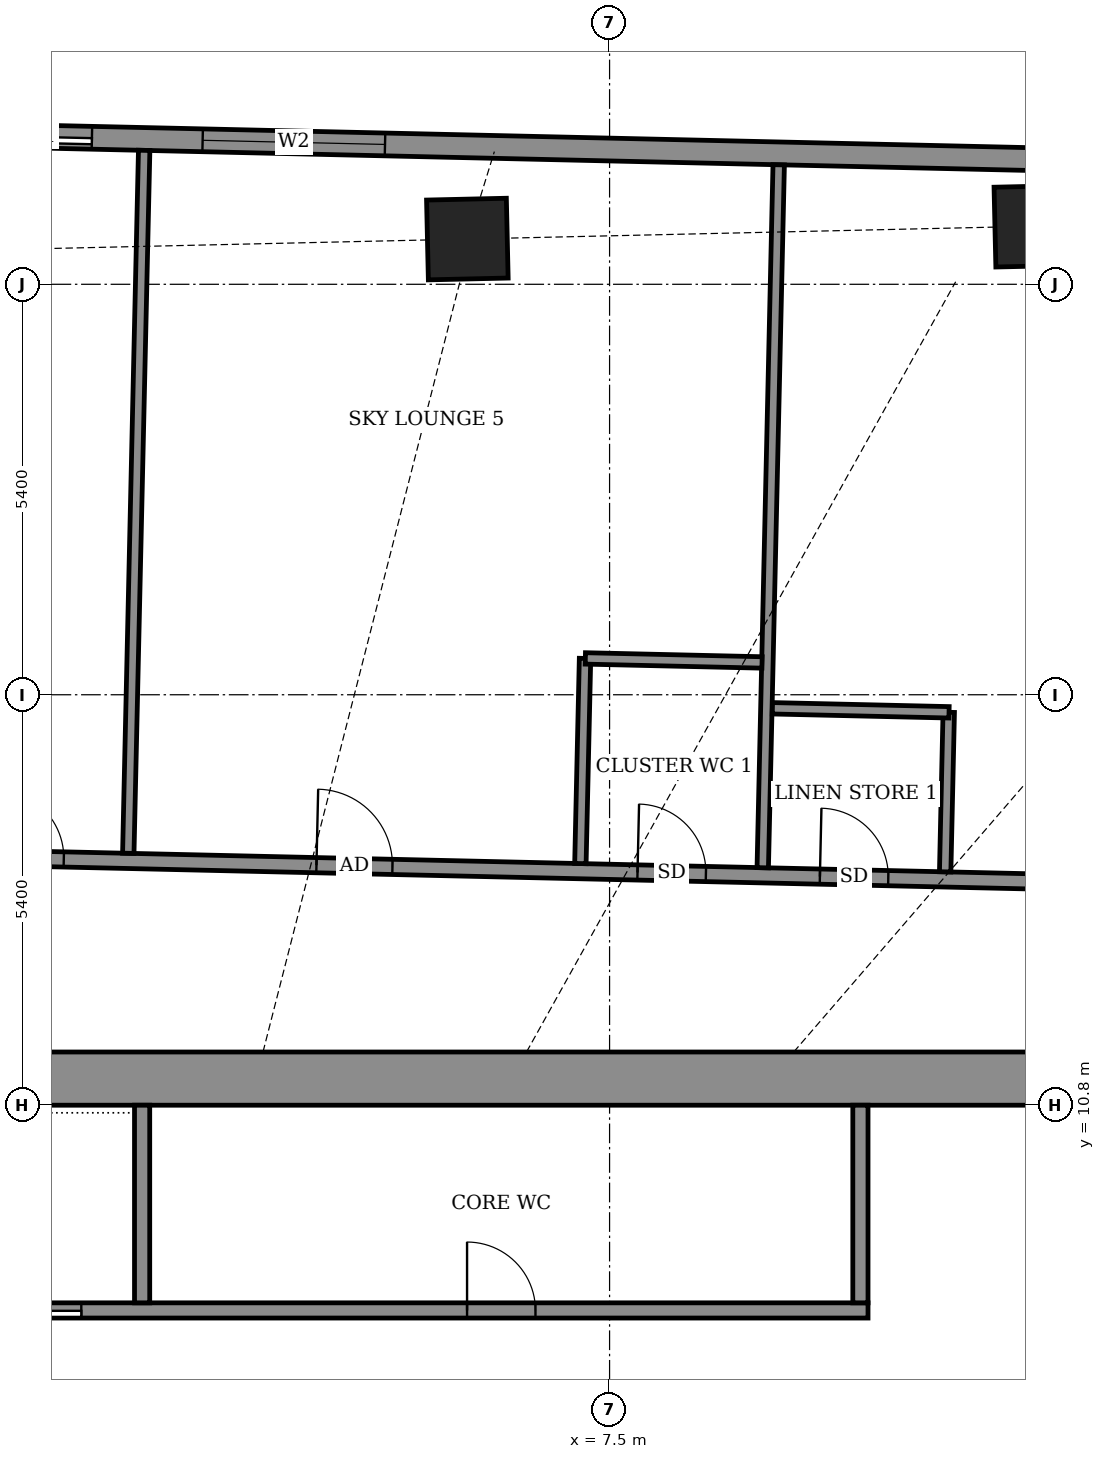
"""IFC4 building model, lengths in metres.
Left out: names, types, materials, properties, quantities, classifications, styles, units other than length and angle.
Written with IfcOpenShell. Run it as: python <this file> out.ifc"""

import sys

from ifc_helpers import new_model, si_unit, direction, frame, frame_2d, origin, origin_2d, place, context, subcontext, project, spatial, rectangle, extrude, element, fill, save


model = new_model("IFC4")
c1 = context("Model", 3, precision=1e-05, world=origin(), true_north=direction((0.0, 1.0)))
c2 = subcontext(c1, "Body", "Model", "MODEL_VIEW")
j1 = project(units=[si_unit("LENGTHUNIT", "METRE"), si_unit("PLANEANGLEUNIT", "RADIAN")], contexts=[c1])
p1 = place(None, origin())
s1 = spatial("IfcSite", under=j1, at=p1, CompositionType="ELEMENT")
p2 = place(p1, origin())
s2 = spatial("IfcBuilding", under=s1, at=p2, CompositionType="ELEMENT")
p3 = place(p2, frame((0.0, 0.0, 252.7)))
s3 = spatial("IfcBuildingStorey", under=s2, at=p3, CompositionType="ELEMENT", Elevation=252.7)
for number, where, z_axis, x_axis in (
    (1, (13.095, 22.364, -0.55), (0.0, 0.0, 1.0), (-1.0, -0.023, 0.0)),
    (2, (5.629, 22.195, -0.55), (0.0, 0.0, 1.0), (-1.0, -0.023, 0.0)),
):
    element("IfcColumn", number, at=place(p3, frame(where, z_axis=z_axis, x_axis=x_axis)), inside=s3, PredefinedType="COLUMN", context=c2, shape_type="SweptSolid", body=[
        extrude(rectangle(XDim=1.05, YDim=1.05, at=origin_2d()), origin(), (0.0, 0.0, 1.0), 4.6),
    ])
p4 = place(p3, frame((26.35, 22.945, 0.0), z_axis=(0.0, 0.0, 1.0), x_axis=(-0.999742523712, 0.022691105788, 0.0)))
e3 = element("IfcWall", 3, at=p4, inside=s3, PredefinedType="SOLIDWALL", context=c2, shape_type="SweptSolid", body=[
    extrude(rectangle(XDim=47.771, YDim=0.3, at=frame_2d((23.886, 0.0))), origin(), (0.0, 0.0, 1.0), 2.45),
])
p5 = place(p4, frame((1.969, 0.0, 0.0)))
e4 = element("IfcOpeningElement", 4, at=p5, cuts=e3, PredefinedType="OPENING", context=c2, shape_type="SweptSolid", body=[
    extrude(rectangle(XDim=1.5, YDim=2.4, at=frame_2d((0.75, 1.2))), frame((0.0, 0.16, 0.0), z_axis=(0.0, -1.0, 0.0), x_axis=(1.0, 0.0, 0.0)), (0.0, 0.0, 1.0), 0.32),
])
p6 = place(p4, frame((9.356, 0.0, 0.9)))
e5 = element("IfcOpeningElement", 5, at=p6, cuts=e3, PredefinedType="OPENING", context=c2, shape_type="SweptSolid", body=[
    extrude(rectangle(XDim=2.4, YDim=1.5, at=frame_2d((1.2, 0.75))), frame((0.0, 0.16, 0.0), z_axis=(0.0, -1.0, 0.0), x_axis=(1.0, 0.0, 0.0)), (0.0, 0.0, 1.0), 0.32),
])
p7 = place(p4, frame((21.81, 0.0, 0.9)))
e6 = element("IfcOpeningElement", 6, at=p7, cuts=e3, PredefinedType="OPENING", context=c2, shape_type="SweptSolid", body=[
    extrude(rectangle(XDim=2.4, YDim=1.5, at=frame_2d((1.2, 0.75))), frame((0.0, 0.16, 0.0), z_axis=(0.0, -1.0, 0.0), x_axis=(1.0, 0.0, 0.0)), (0.0, 0.0, 1.0), 0.32),
])
p8 = place(p4, frame((25.667, 0.0, 0.0)))
e7 = element("IfcOpeningElement", 7, at=p8, cuts=e3, PredefinedType="OPENING", context=c2, shape_type="SweptSolid", body=[
    extrude(rectangle(XDim=1.5, YDim=2.4, at=frame_2d((0.75, 1.2))), frame((0.0, 0.16, 0.0), z_axis=(0.0, -1.0, 0.0), x_axis=(1.0, 0.0, 0.0)), (0.0, 0.0, 1.0), 0.32),
])
p9 = place(p4, frame((30.997, 0.0, 0.9)))
e8 = element("IfcOpeningElement", 8, at=p9, cuts=e3, PredefinedType="OPENING", context=c2, shape_type="SweptSolid", body=[
    extrude(rectangle(XDim=2.4, YDim=1.5, at=frame_2d((1.2, 0.75))), frame((0.0, 0.16, 0.0), z_axis=(0.0, -1.0, 0.0), x_axis=(1.0, 0.0, 0.0)), (0.0, 0.0, 1.0), 0.32),
])
p10 = place(p4, frame((36.222, 0.0, 0.9)))
e9 = element("IfcOpeningElement", 9, at=p10, cuts=e3, PredefinedType="OPENING", context=c2, shape_type="SweptSolid", body=[
    extrude(rectangle(XDim=2.4, YDim=1.5, at=frame_2d((1.2, 0.75))), frame((0.0, 0.16, 0.0), z_axis=(0.0, -1.0, 0.0), x_axis=(1.0, 0.0, 0.0)), (0.0, 0.0, 1.0), 0.32),
])
p11 = place(p4, frame((42.972, 0.0, 0.9)))
e10 = element("IfcOpeningElement", 10, at=p11, cuts=e3, PredefinedType="OPENING", context=c2, shape_type="SweptSolid", body=[
    extrude(rectangle(XDim=2.4, YDim=1.5, at=frame_2d((1.2, 0.75))), frame((0.0, 0.16, 0.0), z_axis=(0.0, -1.0, 0.0), x_axis=(1.0, 0.0, 0.0)), (0.0, 0.0, 1.0), 0.32),
])
p12 = place(p3, frame((-24.974, 14.607, 0.0), z_axis=(0.0, 0.0, 1.0), x_axis=(0.999742823946, -0.02267787398, 0.0)))
e11 = element("IfcWall", 11, at=p12, inside=s3, PredefinedType="PARTITIONING", context=c2, shape_type="SweptSolid", body=[
    extrude(rectangle(XDim=48.284, YDim=0.2, at=frame_2d((24.142, 0.0))), origin(), (0.0, 0.0, 1.0), 2.45),
])
p13 = place(p12, frame((46.283, 0.0, 0.0)))
e12 = element("IfcOpeningElement", 12, at=p13, cuts=e11, PredefinedType="OPENING", context=c2, shape_type="SweptSolid", body=[
    extrude(rectangle(XDim=1.0, YDim=2.1, at=frame_2d((0.5, 1.05))), frame((0.0, 0.11, 0.0), z_axis=(0.0, -1.0, 0.0), x_axis=(1.0, 0.0, 0.0)), (0.0, 0.0, 1.0), 0.22),
])
p14 = place(p12, frame((43.75, 0.0, 0.0)))
e13 = element("IfcOpeningElement", 13, at=p14, cuts=e11, PredefinedType="OPENING", context=c2, shape_type="SweptSolid", body=[
    extrude(rectangle(XDim=0.9, YDim=2.1, at=frame_2d((0.45, 1.05))), frame((0.0, 0.11, 0.0), z_axis=(0.0, -1.0, 0.0), x_axis=(1.0, 0.0, 0.0)), (0.0, 0.0, 1.0), 0.22),
])
p15 = place(p12, frame((39.4, 0.0, 0.0)))
e14 = element("IfcOpeningElement", 14, at=p15, cuts=e11, PredefinedType="OPENING", context=c2, shape_type="SweptSolid", body=[
    extrude(rectangle(XDim=1.0, YDim=2.1, at=frame_2d((0.5, 1.05))), frame((0.0, 0.11, 0.0), z_axis=(0.0, -1.0, 0.0), x_axis=(1.0, 0.0, 0.0)), (0.0, 0.0, 1.0), 0.22),
])
p16 = place(p12, frame((35.25, 0.0, 0.0)))
e15 = element("IfcOpeningElement", 15, at=p16, cuts=e11, PredefinedType="OPENING", context=c2, shape_type="SweptSolid", body=[
    extrude(rectangle(XDim=0.9, YDim=2.1, at=frame_2d((0.45, 1.05))), frame((0.0, 0.11, 0.0), z_axis=(0.0, -1.0, 0.0), x_axis=(1.0, 0.0, 0.0)), (0.0, 0.0, 1.0), 0.22),
])
p17 = place(p12, frame((28.625, 0.0, 0.0)))
e16 = element("IfcOpeningElement", 16, at=p17, cuts=e11, PredefinedType="OPENING", context=c2, shape_type="SweptSolid", body=[
    extrude(rectangle(XDim=1.0, YDim=2.1, at=frame_2d((0.5, 1.05))), frame((0.0, 0.11, 0.0), z_axis=(0.0, -1.0, 0.0), x_axis=(1.0, 0.0, 0.0)), (0.0, 0.0, 1.0), 0.22),
])
p18 = place(p12, frame((32.85, 0.0, 0.0)))
e17 = element("IfcOpeningElement", 17, at=p18, cuts=e11, PredefinedType="OPENING", context=c2, shape_type="SweptSolid", body=[
    extrude(rectangle(XDim=0.9, YDim=2.1, at=frame_2d((0.45, 1.05))), frame((0.0, 0.11, 0.0), z_axis=(0.0, -1.0, 0.0), x_axis=(1.0, 0.0, 0.0)), (0.0, 0.0, 1.0), 0.22),
])
p19 = place(p12, frame((24.4, 0.0, 0.0)))
e18 = element("IfcOpeningElement", 18, at=p19, cuts=e11, PredefinedType="OPENING", context=c2, shape_type="SweptSolid", body=[
    extrude(rectangle(XDim=0.9, YDim=2.1, at=frame_2d((0.45, 1.05))), frame((0.0, 0.11, 0.0), z_axis=(0.0, -1.0, 0.0), x_axis=(1.0, 0.0, 0.0)), (0.0, 0.0, 1.0), 0.22),
])
p20 = place(p12, frame((17.225, 0.0, 0.0)))
e19 = element("IfcOpeningElement", 19, at=p20, cuts=e11, PredefinedType="OPENING", context=c2, shape_type="SweptSolid", body=[
    extrude(rectangle(XDim=1.0, YDim=2.1, at=frame_2d((0.5, 1.05))), frame((0.0, 0.11, 0.0), z_axis=(0.0, -1.0, 0.0), x_axis=(1.0, 0.0, 0.0)), (0.0, 0.0, 1.0), 0.22),
])
p21 = place(p12, frame((19.5, 0.0, 0.0)))
e20 = element("IfcOpeningElement", 20, at=p21, cuts=e11, PredefinedType="OPENING", context=c2, shape_type="SweptSolid", body=[
    extrude(rectangle(XDim=0.9, YDim=2.1, at=frame_2d((0.45, 1.05))), frame((0.0, 0.11, 0.0), z_axis=(0.0, -1.0, 0.0), x_axis=(1.0, 0.0, 0.0)), (0.0, 0.0, 1.0), 0.22),
])
p22 = place(p12, frame((14.4, 0.0, 0.0)))
e21 = element("IfcOpeningElement", 21, at=p22, cuts=e11, PredefinedType="OPENING", context=c2, shape_type="SweptSolid", body=[
    extrude(rectangle(XDim=1.0, YDim=2.1, at=frame_2d((0.5, 1.05))), frame((0.0, 0.11, 0.0), z_axis=(0.0, -1.0, 0.0), x_axis=(1.0, 0.0, 0.0)), (0.0, 0.0, 1.0), 0.22),
])
p23 = place(p12, frame((11.45, 0.0, 0.0)))
e22 = element("IfcOpeningElement", 22, at=p23, cuts=e11, PredefinedType="OPENING", context=c2, shape_type="SweptSolid", body=[
    extrude(rectangle(XDim=0.9, YDim=2.1, at=frame_2d((0.45, 1.05))), frame((0.0, 0.11, 0.0), z_axis=(0.0, -1.0, 0.0), x_axis=(1.0, 0.0, 0.0)), (0.0, 0.0, 1.0), 0.22),
])
p24 = place(p12, frame((2.95, 0.0, 0.0)))
e23 = element("IfcOpeningElement", 23, at=p24, cuts=e11, PredefinedType="OPENING", context=c2, shape_type="SweptSolid", body=[
    extrude(rectangle(XDim=1.0, YDim=2.1, at=frame_2d((0.5, 1.05))), frame((0.0, 0.11, 0.0), z_axis=(0.0, -1.0, 0.0), x_axis=(1.0, 0.0, 0.0)), (0.0, 0.0, 1.0), 0.22),
])
p25 = place(p12, frame((9.05, 0.0, 0.0)))
e24 = element("IfcOpeningElement", 24, at=p25, cuts=e11, PredefinedType="OPENING", context=c2, shape_type="SweptSolid", body=[
    extrude(rectangle(XDim=0.9, YDim=2.1, at=frame_2d((0.45, 1.05))), frame((0.0, 0.11, 0.0), z_axis=(0.0, -1.0, 0.0), x_axis=(1.0, 0.0, 0.0)), (0.0, 0.0, 1.0), 0.22),
])
p26 = place(p3, frame((1.168, 14.114, 0.0), z_axis=(0.0, 0.0, 1.0), x_axis=(0.022591909275, 0.999744770247, 0.0)))
e25 = element("IfcWall", 25, at=p26, inside=s3, PredefinedType="PARTITIONING", context=c2, shape_type="SweptSolid", body=[
    extrude(rectangle(XDim=9.25, YDim=0.15, at=frame_2d((4.625, 0.0))), origin(), (0.0, 0.0, 1.0), 2.45),
])
p27 = place(p3, frame((7.116, 13.979, 0.0), z_axis=(0.0, 0.0, 1.0), x_axis=(0.02260842146, 0.999744396973, 0.0)))
e26 = element("IfcWall", 26, at=p27, inside=s3, PredefinedType="PARTITIONING", context=c2, shape_type="SweptSolid", body=[
    extrude(rectangle(XDim=2.7, YDim=0.15, at=frame_2d((1.35, 0.0))), origin(), (0.0, 0.0, 1.0), 2.85),
])
p28 = place(p3, frame((9.515, 13.924, 0.0), z_axis=(0.0, 0.0, 1.0), x_axis=(0.022723803418, 0.999741781041, 0.0)))
e27 = element("IfcWall", 27, at=p28, inside=s3, PredefinedType="PARTITIONING", context=c2, shape_type="SweptSolid", body=[
    extrude(rectangle(XDim=9.25, YDim=0.15, at=frame_2d((4.625, 0.0))), origin(), (0.0, 0.0, 1.0), 2.45),
])
p29 = place(p3, frame((11.915, 13.87, 0.0), z_axis=(0.0, 0.0, 1.0), x_axis=(0.022327804475, 0.999750703499, 0.0)))
e28 = element("IfcWall", 28, at=p29, inside=s3, PredefinedType="PARTITIONING", context=c2, shape_type="SweptSolid", body=[
    extrude(rectangle(XDim=2.099, YDim=0.15, at=frame_2d((1.05, 0.0))), origin(), (0.0, 0.0, 1.0), 2.65),
])
p30 = place(p3, frame((9.642, 16.022, 0.0), z_axis=(0.0, 0.0, 1.0), x_axis=(0.999740260747, -0.02279059109, 0.0)))
e29 = element("IfcWall", 29, at=p30, inside=s3, PredefinedType="PARTITIONING", context=c2, shape_type="SweptSolid", body=[
    extrude(rectangle(XDim=2.324, YDim=0.15, at=frame_2d((1.162, 0.0))), origin(), (0.0, 0.0, 1.0), 2.85),
])
p31 = place(p3, frame((7.181, 16.678, 0.0), z_axis=(0.0, 0.0, 1.0), x_axis=(0.99974053329, -0.022778632478, 0.0)))
e30 = element("IfcWall", 30, at=p31, inside=s3, PredefinedType="PARTITIONING", context=c2, shape_type="SweptSolid", body=[
    extrude(rectangle(XDim=2.326, YDim=0.15, at=frame_2d((1.163, 0.0))), origin(), (0.0, 0.0, 1.0), 2.85),
])
p32 = place(p3, frame((-14.5, 11.15, 0.0), z_axis=(0.0, 0.0, 1.0), x_axis=(1.0, 0.0, 0.0)))
e31 = element("IfcWall", 31, at=p32, inside=s3, PredefinedType="SHEAR", context=c2, shape_type="SweptSolid", body=[
    extrude(rectangle(XDim=29.0, YDim=0.7, at=frame_2d((14.5, 0.0))), origin(), (0.0, 0.0, 1.0), 4.6),
])
p33 = place(p3, frame((-10.9, 8.1, 0.0), z_axis=(0.0, 0.0, 1.0), x_axis=(1.0, 0.0, 0.0)))
e32 = element("IfcWall", 32, at=p33, inside=s3, PredefinedType="SHEAR", context=c2, shape_type="SweptSolid", body=[
    extrude(rectangle(XDim=21.8, YDim=0.2, at=frame_2d((10.9, 0.0))), origin(), (0.0, 0.0, 1.0), 4.05),
])
p34 = place(p33, frame((4.95, 0.0, 0.0)))
e33 = element("IfcOpeningElement", 33, at=p34, cuts=e32, PredefinedType="OPENING", context=c2, shape_type="SweptSolid", body=[
    extrude(rectangle(XDim=1.1, YDim=2.1, at=frame_2d((0.55, 1.05))), frame((0.0, 0.11, 0.0), z_axis=(0.0, -1.0, 0.0), x_axis=(1.0, 0.0, 0.0)), (0.0, 0.0, 1.0), 0.22),
])
p35 = place(p33, frame((7.65, 0.0, 0.0)))
e34 = element("IfcOpeningElement", 34, at=p35, cuts=e32, PredefinedType="OPENING", context=c2, shape_type="SweptSolid", body=[
    extrude(rectangle(XDim=1.1, YDim=2.1, at=frame_2d((0.55, 1.05))), frame((0.0, 0.11, 0.0), z_axis=(0.0, -1.0, 0.0), x_axis=(1.0, 0.0, 0.0)), (0.0, 0.0, 1.0), 0.22),
])
p36 = place(p33, frame((10.35, 0.0, 0.0)))
e35 = element("IfcOpeningElement", 35, at=p36, cuts=e32, PredefinedType="OPENING", context=c2, shape_type="SweptSolid", body=[
    extrude(rectangle(XDim=1.1, YDim=2.1, at=frame_2d((0.55, 1.05))), frame((0.0, 0.11, 0.0), z_axis=(0.0, -1.0, 0.0), x_axis=(1.0, 0.0, 0.0)), (0.0, 0.0, 1.0), 0.22),
])
p37 = place(p33, frame((1.675, 0.0, 0.0)))
e36 = element("IfcOpeningElement", 36, at=p37, cuts=e32, PredefinedType="OPENING", context=c2, shape_type="SweptSolid", body=[
    extrude(rectangle(XDim=0.9, YDim=2.1, at=frame_2d((0.45, 1.05))), frame((0.0, 0.11, 0.0), z_axis=(0.0, -1.0, 0.0), x_axis=(1.0, 0.0, 0.0)), (0.0, 0.0, 1.0), 0.22),
])
p38 = place(p33, frame((16.525, 0.0, 0.0)))
e37 = element("IfcOpeningElement", 37, at=p38, cuts=e32, PredefinedType="OPENING", context=c2, shape_type="SweptSolid", body=[
    extrude(rectangle(XDim=0.9, YDim=2.1, at=frame_2d((0.45, 1.05))), frame((0.0, 0.11, 0.0), z_axis=(0.0, -1.0, 0.0), x_axis=(1.0, 0.0, 0.0)), (0.0, 0.0, 1.0), 0.22),
])
p39 = place(p3, frame((1.35, 8.2, 0.0), z_axis=(0.0, 0.0, 1.0), x_axis=(0.0, 1.0, 0.0)))
e38 = element("IfcWall", 38, at=p39, inside=s3, PredefinedType="SHEAR", context=c2, shape_type="SweptSolid", body=[
    extrude(rectangle(XDim=2.6, YDim=0.2, at=frame_2d((1.3, 0.0))), origin(), (0.0, 0.0, 1.0), 4.05),
])
p40 = place(p3, frame((10.8, 8.2, 0.0), z_axis=(0.0, 0.0, 1.0), x_axis=(0.0, 1.0, 0.0)))
e39 = element("IfcWall", 39, at=p40, inside=s3, PredefinedType="STANDARD", context=c2, shape_type="SweptSolid", body=[
    extrude(rectangle(XDim=2.6, YDim=0.2, at=frame_2d((1.3, 0.0))), origin(), (0.0, 0.0, 1.0), 4.05),
])
p41 = place(p7, origin())
e40 = element("IfcWindow", 40, at=p41, inside=s3, PartitioningType="DOUBLE_PANEL_VERTICAL", PredefinedType="WINDOW", context=c2, shape_type="SweptSolid", body=[
    extrude(rectangle(XDim=2.4, YDim=1.5, at=frame_2d((1.2, 0.75))), frame((0.0, 0.03, 0.0), z_axis=(0.0, -1.0, 0.0), x_axis=(1.0, 0.0, 0.0)), (0.0, 0.0, 1.0), 0.06),
])
fill(e6, e40)
p42 = place(p8, origin())
e41 = element("IfcDoor", 41, at=p42, inside=s3, OperationType="SLIDING_TO_LEFT", PredefinedType="DOOR", context=c2, shape_type="SweptSolid", body=[
    extrude(rectangle(XDim=1.5, YDim=2.4, at=frame_2d((0.75, 1.2))), frame((0.0, 0.025, 0.0), z_axis=(0.0, -1.0, 0.0), x_axis=(1.0, 0.0, 0.0)), (0.0, 0.0, 1.0), 0.05),
])
fill(e7, e41)
p43 = place(p16, origin())
e42 = element("IfcDoor", 42, at=p43, inside=s3, OperationType="SINGLE_SWING_RIGHT", PredefinedType="DOOR", context=c2, shape_type="SweptSolid", body=[
    extrude(rectangle(XDim=0.9, YDim=2.1, at=frame_2d((0.45, 1.05))), frame((0.0, 0.025, 0.0), z_axis=(0.0, -1.0, 0.0), x_axis=(1.0, 0.0, 0.0)), (0.0, 0.0, 1.0), 0.05),
])
fill(e15, e42)
p44 = place(p17, origin())
e43 = element("IfcDoor", 43, at=p44, inside=s3, OperationType="SINGLE_SWING_LEFT", PredefinedType="DOOR", context=c2, shape_type="SweptSolid", body=[
    extrude(rectangle(XDim=1.0, YDim=2.1, at=frame_2d((0.5, 1.05))), frame((0.0, 0.025, 0.0), z_axis=(0.0, -1.0, 0.0), x_axis=(1.0, 0.0, 0.0)), (0.0, 0.0, 1.0), 0.05),
])
fill(e16, e43)
p45 = place(p18, origin())
e44 = element("IfcDoor", 44, at=p45, inside=s3, OperationType="SINGLE_SWING_LEFT", PredefinedType="DOOR", context=c2, shape_type="SweptSolid", body=[
    extrude(rectangle(XDim=0.9, YDim=2.1, at=frame_2d((0.45, 1.05))), frame((0.0, 0.025, 0.0), z_axis=(0.0, -1.0, 0.0), x_axis=(1.0, 0.0, 0.0)), (0.0, 0.0, 1.0), 0.05),
])
fill(e17, e44)
p46 = place(p19, origin())
e45 = element("IfcDoor", 45, at=p46, inside=s3, OperationType="SINGLE_SWING_LEFT", PredefinedType="DOOR", context=c2, shape_type="SweptSolid", body=[
    extrude(rectangle(XDim=0.9, YDim=2.1, at=frame_2d((0.45, 1.05))), frame((0.0, 0.025, 0.0), z_axis=(0.0, -1.0, 0.0), x_axis=(1.0, 0.0, 0.0)), (0.0, 0.0, 1.0), 0.05),
])
fill(e18, e45)
p47 = place(p36, origin())
e46 = element("IfcDoor", 46, at=p47, inside=s3, OperationType="SLIDING_TO_LEFT", PredefinedType="DOOR", context=c2, shape_type="SweptSolid", body=[
    extrude(rectangle(XDim=1.1, YDim=2.1, at=frame_2d((0.55, 1.05))), frame((0.0, 0.025, 0.0), z_axis=(0.0, -1.0, 0.0), x_axis=(1.0, 0.0, 0.0)), (0.0, 0.0, 1.0), 0.05),
])
fill(e35, e46)
p48 = place(p38, origin())
e47 = element("IfcDoor", 47, at=p48, inside=s3, OperationType="SINGLE_SWING_RIGHT", PredefinedType="DOOR", context=c2, shape_type="SweptSolid", body=[
    extrude(rectangle(XDim=0.9, YDim=2.1, at=frame_2d((0.45, 1.05))), frame((0.0, 0.025, 0.0), z_axis=(0.0, -1.0, 0.0), x_axis=(1.0, 0.0, 0.0)), (0.0, 0.0, 1.0), 0.05),
])
fill(e37, e47)
save(model, sys.argv[1])
